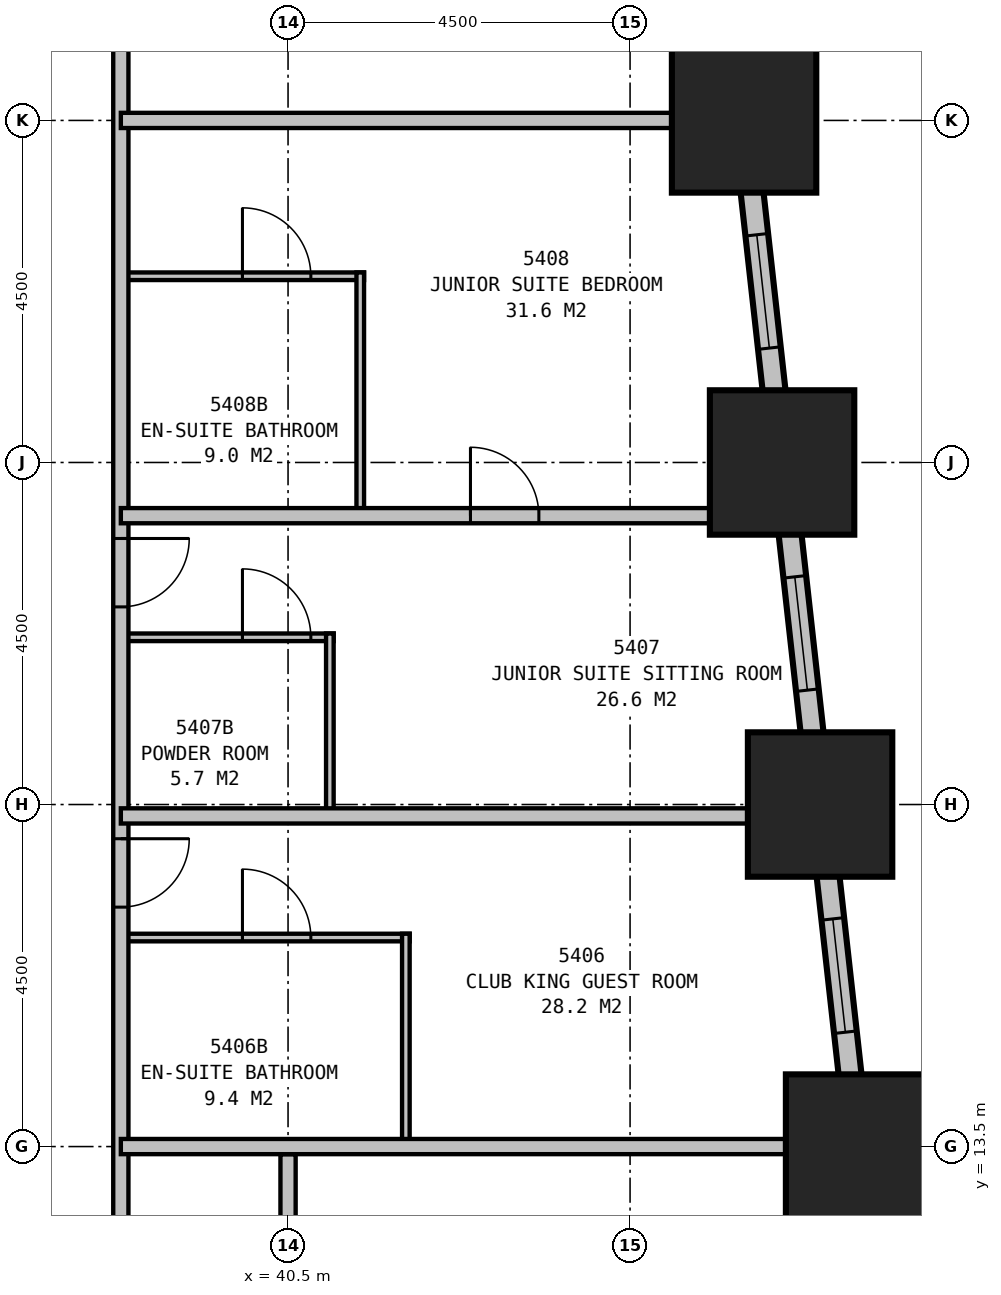
"""IFC4 building model, lengths in metres.
Left out: names, types, materials, properties, quantities, classifications, styles, units other than length and angle.
Written with IfcOpenShell. Run it as: python <this file> out.ifc"""

import sys

from ifc_helpers import new_model, si_unit, direction, frame, frame_2d, origin, origin_2d, place, context, subcontext, project, spatial, rectangle, extrude, element, fill, save


model = new_model("IFC4")
c1 = context("Model", 3, precision=1e-05, world=origin(), true_north=direction((0.0, 1.0)))
c2 = subcontext(c1, "Body", "Model", "MODEL_VIEW")
j1 = project(units=[si_unit("LENGTHUNIT", "METRE"), si_unit("PLANEANGLEUNIT", "RADIAN")], contexts=[c1])
p1 = place(None, origin())
s1 = spatial("IfcSite", under=j1, at=p1, CompositionType="ELEMENT")
p2 = place(p1, origin())
s2 = spatial("IfcBuilding", under=s1, at=p2, CompositionType="ELEMENT")
p3 = place(p2, frame((0.0, 0.0, 207.9)))
s3 = spatial("IfcBuildingStorey", under=s2, at=p3, CompositionType="ELEMENT", Elevation=207.9)
for number, where, z_axis, x_axis in (
    (1, (48.0, 13.5, 0.0), (0.0, 0.0, 1.0), (1.0, 0.0, 0.0)),
    (2, (47.5, 18.0, 0.0), (0.0, 0.0, 1.0), (1.0, 0.0, 0.0)),
    (3, (47.0, 22.5, 0.0), (0.0, 0.0, 1.0), (1.0, 0.0, 0.0)),
    (4, (46.5, 27.0, 0.0), (0.0, 0.0, 1.0), (1.0, 0.0, 0.0)),
):
    element("IfcColumn", number, at=place(p3, frame(where, z_axis=z_axis, x_axis=x_axis)), inside=s3, PredefinedType="COLUMN", context=c2, shape_type="SweptSolid", body=[
        extrude(rectangle(XDim=1.9, YDim=1.9, at=origin_2d()), origin(), (0.0, 0.0, 1.0), 3.5),
    ])
p4 = place(p3, frame((49.017, 4.351, 0.0), z_axis=(0.0, 0.0, 1.0), x_axis=(-0.110433201132, 0.993883548555, 0.0)))
e5 = element("IfcWall", 5, at=p4, inside=s3, PredefinedType="STANDARD", context=c2, shape_type="SweptSolid", body=[
    extrude(rectangle(XDim=31.994, YDim=0.3, at=frame_2d((15.997, 0.0))), origin(), (0.0, 0.0, 1.0), 1.9),
])
p5 = place(p4, frame((1.664, 0.0, 0.5)))
e6 = element("IfcOpeningElement", 6, at=p5, cuts=e5, PredefinedType="OPENING", context=c2, shape_type="SweptSolid", body=[
    extrude(rectangle(XDim=1.5, YDim=1.2, at=frame_2d((0.75, 0.6))), frame((0.0, 0.16, 0.0), z_axis=(0.0, -1.0, 0.0), x_axis=(1.0, 0.0, 0.0)), (0.0, 0.0, 1.0), 0.32),
])
p6 = place(p4, frame((6.192, 0.0, 0.5)))
e7 = element("IfcOpeningElement", 7, at=p6, cuts=e5, PredefinedType="OPENING", context=c2, shape_type="SweptSolid", body=[
    extrude(rectangle(XDim=1.5, YDim=1.2, at=frame_2d((0.75, 0.6))), frame((0.0, 0.16, 0.0), z_axis=(0.0, -1.0, 0.0), x_axis=(1.0, 0.0, 0.0)), (0.0, 0.0, 1.0), 0.32),
])
p7 = place(p4, frame((10.719, 0.0, 0.5)))
e8 = element("IfcOpeningElement", 8, at=p7, cuts=e5, PredefinedType="OPENING", context=c2, shape_type="SweptSolid", body=[
    extrude(rectangle(XDim=1.5, YDim=1.2, at=frame_2d((0.75, 0.6))), frame((0.0, 0.16, 0.0), z_axis=(0.0, -1.0, 0.0), x_axis=(1.0, 0.0, 0.0)), (0.0, 0.0, 1.0), 0.32),
])
p8 = place(p4, frame((15.247, 0.0, 0.5)))
e9 = element("IfcOpeningElement", 9, at=p8, cuts=e5, PredefinedType="OPENING", context=c2, shape_type="SweptSolid", body=[
    extrude(rectangle(XDim=1.5, YDim=1.2, at=frame_2d((0.75, 0.6))), frame((0.0, 0.16, 0.0), z_axis=(0.0, -1.0, 0.0), x_axis=(1.0, 0.0, 0.0)), (0.0, 0.0, 1.0), 0.32),
])
p9 = place(p4, frame((19.775, 0.0, 0.5)))
e10 = element("IfcOpeningElement", 10, at=p9, cuts=e5, PredefinedType="OPENING", context=c2, shape_type="SweptSolid", body=[
    extrude(rectangle(XDim=1.5, YDim=1.2, at=frame_2d((0.75, 0.6))), frame((0.0, 0.16, 0.0), z_axis=(0.0, -1.0, 0.0), x_axis=(1.0, 0.0, 0.0)), (0.0, 0.0, 1.0), 0.32),
])
p10 = place(p4, frame((24.302, 0.0, 0.5)))
e11 = element("IfcOpeningElement", 11, at=p10, cuts=e5, PredefinedType="OPENING", context=c2, shape_type="SweptSolid", body=[
    extrude(rectangle(XDim=1.5, YDim=1.2, at=frame_2d((0.75, 0.6))), frame((0.0, 0.16, 0.0), z_axis=(0.0, -1.0, 0.0), x_axis=(1.0, 0.0, 0.0)), (0.0, 0.0, 1.0), 0.32),
])
p11 = place(p4, frame((28.83, 0.0, 0.5)))
e12 = element("IfcOpeningElement", 12, at=p11, cuts=e5, PredefinedType="OPENING", context=c2, shape_type="SweptSolid", body=[
    extrude(rectangle(XDim=1.5, YDim=1.2, at=frame_2d((0.75, 0.6))), frame((0.0, 0.16, 0.0), z_axis=(0.0, -1.0, 0.0), x_axis=(1.0, 0.0, 0.0)), (0.0, 0.0, 1.0), 0.32),
])
p12 = place(p3, frame((38.3, 10.6, 0.0), z_axis=(0.0, 0.0, 1.0), x_axis=(0.0, 1.0, 0.0)))
e13 = element("IfcWall", 13, at=p12, inside=s3, PredefinedType="PARTITIONING", context=c2, shape_type="SweptSolid", body=[
    extrude(rectangle(XDim=18.7, YDim=0.2, at=frame_2d((9.35, 0.0))), origin(), (0.0, 0.0, 1.0), 3.25),
])
p13 = place(p12, frame((6.95, 0.0, 0.0), z_axis=(0.0, 0.0, 1.0), x_axis=(-1.0, 0.0, 0.0)))
e14 = element("IfcOpeningElement", 14, at=p13, cuts=e13, PredefinedType="OPENING", context=c2, shape_type="SweptSolid", body=[
    extrude(rectangle(XDim=0.9, YDim=2.1, at=frame_2d((0.45, 1.05))), frame((0.0, 0.11, 0.0), z_axis=(0.0, -1.0, 0.0), x_axis=(1.0, 0.0, 0.0)), (0.0, 0.0, 1.0), 0.22),
])
p14 = place(p12, frame((10.9, 0.0, 0.0), z_axis=(0.0, 0.0, 1.0), x_axis=(-1.0, 0.0, 0.0)))
e15 = element("IfcOpeningElement", 15, at=p14, cuts=e13, PredefinedType="OPENING", context=c2, shape_type="SweptSolid", body=[
    extrude(rectangle(XDim=0.9, YDim=2.1, at=frame_2d((0.45, 1.05))), frame((0.0, 0.11, 0.0), z_axis=(0.0, -1.0, 0.0), x_axis=(1.0, 0.0, 0.0)), (0.0, 0.0, 1.0), 0.22),
])
p15 = place(p3, frame((38.3, 17.85, 0.0), z_axis=(0.0, 0.0, 1.0), x_axis=(1.0, 0.0, 0.0)))
e16 = element("IfcWall", 16, at=p15, inside=s3, PredefinedType="PARTITIONING", context=c2, shape_type="SweptSolid", body=[
    extrude(rectangle(XDim=9.216, YDim=0.2, at=frame_2d((4.608, 0.0))), origin(), (0.0, 0.0, 1.0), 2.2),
])
p16 = place(p3, frame((38.3, 21.8, 0.0), z_axis=(0.0, 0.0, 1.0), x_axis=(1.0, 0.0, 0.0)))
e17 = element("IfcWall", 17, at=p16, inside=s3, PredefinedType="PARTITIONING", context=c2, shape_type="SweptSolid", body=[
    extrude(rectangle(XDim=8.777, YDim=0.2, at=frame_2d((4.388, 0.0))), origin(), (0.0, 0.0, 1.0), 3.25),
])
p17 = place(p16, frame((4.6, 0.0, 0.0)))
e18 = element("IfcOpeningElement", 18, at=p17, cuts=e17, PredefinedType="OPENING", context=c2, shape_type="SweptSolid", body=[
    extrude(rectangle(XDim=0.9, YDim=2.1, at=frame_2d((0.45, 1.05))), frame((0.0, 0.11, 0.0), z_axis=(0.0, -1.0, 0.0), x_axis=(1.0, 0.0, 0.0)), (0.0, 0.0, 1.0), 0.22),
])
p18 = place(p3, frame((42.05, 13.5, 0.0), z_axis=(0.0, 0.0, 1.0), x_axis=(0.0, 1.0, 0.0)))
e19 = element("IfcWall", 19, at=p18, inside=s3, PredefinedType="PLUMBINGWALL", context=c2, shape_type="SweptSolid", body=[
    extrude(rectangle(XDim=2.8, YDim=0.1, at=frame_2d((1.4, 0.0))), origin(), (0.0, 0.0, 1.0), 3.25),
])
p19 = place(p3, frame((38.3, 16.25, 0.0), z_axis=(0.0, 0.0, 1.0), x_axis=(1.0, 0.0, 0.0)))
e20 = element("IfcWall", 20, at=p19, inside=s3, PredefinedType="PLUMBINGWALL", context=c2, shape_type="SweptSolid", body=[
    extrude(rectangle(XDim=3.8, YDim=0.1, at=frame_2d((1.9, 0.0))), origin(), (0.0, 0.0, 1.0), 3.25),
])
p20 = place(p19, frame((1.6, 0.0, 0.0)))
e21 = element("IfcOpeningElement", 21, at=p20, cuts=e20, PredefinedType="OPENING", context=c2, shape_type="SweptSolid", body=[
    extrude(rectangle(XDim=0.9, YDim=2.1, at=frame_2d((0.45, 1.05))), frame((0.0, 0.06, 0.0), z_axis=(0.0, -1.0, 0.0), x_axis=(1.0, 0.0, 0.0)), (0.0, 0.0, 1.0), 0.12),
])
p21 = place(p3, frame((41.05, 17.85, 0.0), z_axis=(0.0, 0.0, 1.0), x_axis=(0.0, 1.0, 0.0)))
e22 = element("IfcWall", 22, at=p21, inside=s3, PredefinedType="PLUMBINGWALL", context=c2, shape_type="SweptSolid", body=[
    extrude(rectangle(XDim=2.4, YDim=0.1, at=frame_2d((1.2, 0.0))), origin(), (0.0, 0.0, 1.0), 3.25),
])
p22 = place(p3, frame((38.3, 20.2, 0.0), z_axis=(0.0, 0.0, 1.0), x_axis=(1.0, 0.0, 0.0)))
e23 = element("IfcWall", 23, at=p22, inside=s3, PredefinedType="PLUMBINGWALL", context=c2, shape_type="SweptSolid", body=[
    extrude(rectangle(XDim=2.8, YDim=0.1, at=frame_2d((1.4, 0.0))), origin(), (0.0, 0.0, 1.0), 3.25),
])
p23 = place(p22, frame((1.6, 0.0, 0.0)))
e24 = element("IfcOpeningElement", 24, at=p23, cuts=e23, PredefinedType="OPENING", context=c2, shape_type="SweptSolid", body=[
    extrude(rectangle(XDim=0.9, YDim=2.1, at=frame_2d((0.45, 1.05))), frame((0.0, 0.06, 0.0), z_axis=(0.0, -1.0, 0.0), x_axis=(1.0, 0.0, 0.0)), (0.0, 0.0, 1.0), 0.12),
])
p24 = place(p3, frame((41.45, 21.8, 0.0), z_axis=(0.0, 0.0, 1.0), x_axis=(0.0, 1.0, 0.0)))
e25 = element("IfcWall", 25, at=p24, inside=s3, PredefinedType="PLUMBINGWALL", context=c2, shape_type="SweptSolid", body=[
    extrude(rectangle(XDim=3.2, YDim=0.1, at=frame_2d((1.6, 0.0))), origin(), (0.0, 0.0, 1.0), 3.25),
])
p25 = place(p3, frame((38.3, 24.95, 0.0), z_axis=(0.0, 0.0, 1.0), x_axis=(1.0, 0.0, 0.0)))
e26 = element("IfcWall", 26, at=p25, inside=s3, PredefinedType="PLUMBINGWALL", context=c2, shape_type="SweptSolid", body=[
    extrude(rectangle(XDim=3.2, YDim=0.1, at=frame_2d((1.6, 0.0))), origin(), (0.0, 0.0, 1.0), 3.25),
])
p26 = place(p25, frame((1.6, 0.0, 0.0)))
e27 = element("IfcOpeningElement", 27, at=p26, cuts=e26, PredefinedType="OPENING", context=c2, shape_type="SweptSolid", body=[
    extrude(rectangle(XDim=0.9, YDim=2.1, at=frame_2d((0.45, 1.05))), frame((0.0, 0.06, 0.0), z_axis=(0.0, -1.0, 0.0), x_axis=(1.0, 0.0, 0.0)), (0.0, 0.0, 1.0), 0.12),
])
p27 = place(p3, frame((38.3, 13.5, 0.0), z_axis=(0.0, 0.0, 1.0), x_axis=(1.0, 0.0, 0.0)))
e28 = element("IfcWall", 28, at=p27, inside=s3, PredefinedType="PARTITIONING", context=c2, shape_type="SweptSolid", body=[
    extrude(rectangle(XDim=9.921, YDim=0.2, at=frame_2d((4.96, 0.0))), origin(), (0.0, 0.0, 1.0), 1.9),
])
p28 = place(p3, frame((40.5, 4.6, 0.0), z_axis=(0.0, 0.0, 1.0), x_axis=(0.0, 1.0, 0.0)))
e29 = element("IfcWall", 29, at=p28, inside=s3, PredefinedType="PARTITIONING", context=c2, shape_type="SweptSolid", body=[
    extrude(rectangle(XDim=8.8, YDim=0.2, at=frame_2d((4.4, 0.0))), origin(), (0.0, 0.0, 1.0), 2.2),
])
p29 = place(p28, frame((4.05, 0.0, 0.0)))
e30 = element("IfcOpeningElement", 30, at=p29, cuts=e29, PredefinedType="OPENING", context=c2, shape_type="SweptSolid", body=[
    extrude(rectangle(XDim=0.9, YDim=2.1, at=frame_2d((0.45, 1.05))), frame((0.0, 0.11, 0.0), z_axis=(0.0, -1.0, 0.0), x_axis=(1.0, 0.0, 0.0)), (0.0, 0.0, 1.0), 0.22),
])
p30 = place(p3, frame((38.3, 27.0, 0.0), z_axis=(0.0, 0.0, 1.0), x_axis=(1.0, 0.0, 0.0)))
e31 = element("IfcWall", 31, at=p30, inside=s3, PredefinedType="PARTITIONING", context=c2, shape_type="SweptSolid", body=[
    extrude(rectangle(XDim=7.977, YDim=0.2, at=frame_2d((3.988, 0.0))), origin(), (0.0, 0.0, 1.0), 1.9),
])
p31 = place(p7, origin())
e32 = element("IfcWindow", 32, at=p31, inside=s3, PartitioningType="SINGLE_PANEL", PredefinedType="WINDOW", context=c2, shape_type="SweptSolid", body=[
    extrude(rectangle(XDim=1.5, YDim=1.2, at=frame_2d((0.75, 0.6))), frame((0.0, 0.03, 0.0), z_axis=(0.0, -1.0, 0.0), x_axis=(1.0, 0.0, 0.0)), (0.0, 0.0, 1.0), 0.06),
])
fill(e8, e32)
p32 = place(p8, origin())
e33 = element("IfcWindow", 33, at=p32, inside=s3, PartitioningType="SINGLE_PANEL", PredefinedType="WINDOW", context=c2, shape_type="SweptSolid", body=[
    extrude(rectangle(XDim=1.5, YDim=1.2, at=frame_2d((0.75, 0.6))), frame((0.0, 0.03, 0.0), z_axis=(0.0, -1.0, 0.0), x_axis=(1.0, 0.0, 0.0)), (0.0, 0.0, 1.0), 0.06),
])
fill(e9, e33)
p33 = place(p9, origin())
e34 = element("IfcWindow", 34, at=p33, inside=s3, PartitioningType="SINGLE_PANEL", PredefinedType="WINDOW", context=c2, shape_type="SweptSolid", body=[
    extrude(rectangle(XDim=1.5, YDim=1.2, at=frame_2d((0.75, 0.6))), frame((0.0, 0.03, 0.0), z_axis=(0.0, -1.0, 0.0), x_axis=(1.0, 0.0, 0.0)), (0.0, 0.0, 1.0), 0.06),
])
fill(e10, e34)
p34 = place(p13, origin())
e35 = element("IfcDoor", 35, at=p34, inside=s3, OperationType="SINGLE_SWING_LEFT", PredefinedType="DOOR", context=c2, shape_type="SweptSolid", body=[
    extrude(rectangle(XDim=0.9, YDim=2.1, at=frame_2d((0.45, 1.05))), frame((0.0, 0.025, 0.0), z_axis=(0.0, -1.0, 0.0), x_axis=(1.0, 0.0, 0.0)), (0.0, 0.0, 1.0), 0.05),
])
fill(e14, e35)
p35 = place(p14, origin())
e36 = element("IfcDoor", 36, at=p35, inside=s3, OperationType="SINGLE_SWING_LEFT", PredefinedType="DOOR", context=c2, shape_type="SweptSolid", body=[
    extrude(rectangle(XDim=0.9, YDim=2.1, at=frame_2d((0.45, 1.05))), frame((0.0, 0.025, 0.0), z_axis=(0.0, -1.0, 0.0), x_axis=(1.0, 0.0, 0.0)), (0.0, 0.0, 1.0), 0.05),
])
fill(e15, e36)
p36 = place(p17, origin())
e37 = element("IfcDoor", 37, at=p36, inside=s3, OperationType="SINGLE_SWING_LEFT", PredefinedType="DOOR", context=c2, shape_type="SweptSolid", body=[
    extrude(rectangle(XDim=0.9, YDim=2.1, at=frame_2d((0.45, 1.05))), frame((0.0, 0.025, 0.0), z_axis=(0.0, -1.0, 0.0), x_axis=(1.0, 0.0, 0.0)), (0.0, 0.0, 1.0), 0.05),
])
fill(e18, e37)
p37 = place(p20, origin())
e38 = element("IfcDoor", 38, at=p37, inside=s3, OperationType="SINGLE_SWING_LEFT", PredefinedType="DOOR", context=c2, shape_type="SweptSolid", body=[
    extrude(rectangle(XDim=0.9, YDim=2.1, at=frame_2d((0.45, 1.05))), frame((0.0, 0.025, 0.0), z_axis=(0.0, -1.0, 0.0), x_axis=(1.0, 0.0, 0.0)), (0.0, 0.0, 1.0), 0.05),
])
fill(e21, e38)
p38 = place(p23, origin())
e39 = element("IfcDoor", 39, at=p38, inside=s3, OperationType="SINGLE_SWING_LEFT", PredefinedType="DOOR", context=c2, shape_type="SweptSolid", body=[
    extrude(rectangle(XDim=0.9, YDim=2.1, at=frame_2d((0.45, 1.05))), frame((0.0, 0.025, 0.0), z_axis=(0.0, -1.0, 0.0), x_axis=(1.0, 0.0, 0.0)), (0.0, 0.0, 1.0), 0.05),
])
fill(e24, e39)
p39 = place(p26, origin())
e40 = element("IfcDoor", 40, at=p39, inside=s3, OperationType="SINGLE_SWING_LEFT", PredefinedType="DOOR", context=c2, shape_type="SweptSolid", body=[
    extrude(rectangle(XDim=0.9, YDim=2.1, at=frame_2d((0.45, 1.05))), frame((0.0, 0.025, 0.0), z_axis=(0.0, -1.0, 0.0), x_axis=(1.0, 0.0, 0.0)), (0.0, 0.0, 1.0), 0.05),
])
fill(e27, e40)
save(model, sys.argv[1])
